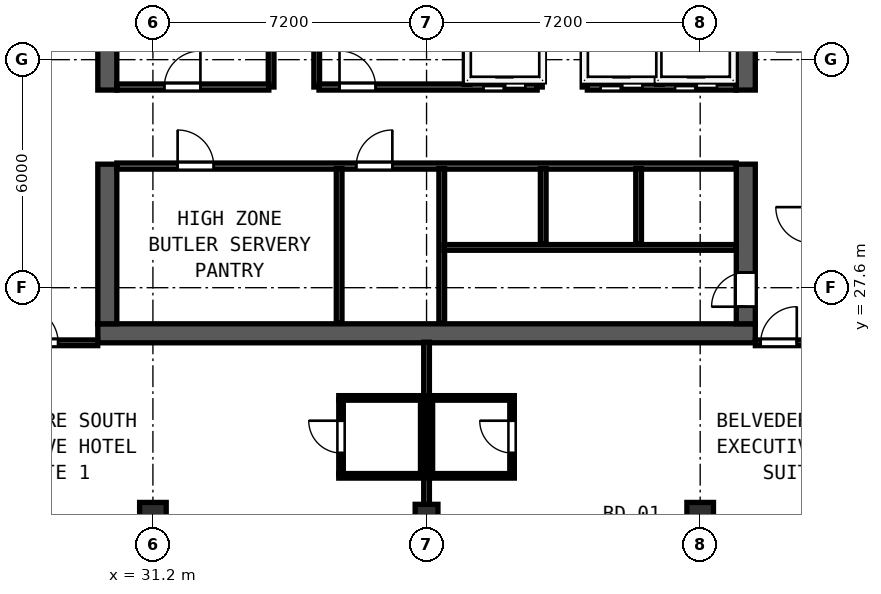
"""IFC4 building model, lengths in metres.
Left out: names, types, materials, properties, quantities, classifications, styles, units other than length and angle.
Written with IfcOpenShell. Run it as: python <this file> out.ifc"""

import sys

from ifc_helpers import new_model, si_unit, direction, frame, frame_2d, origin, origin_2d, place, context, subcontext, project, spatial, rectangle, hollow_rectangle, extrude, element, fill, save


model = new_model("IFC4")
c1 = context("Model", 3, precision=1e-05, world=origin(), true_north=direction((0.0, 1.0)))
c2 = subcontext(c1, "Body", "Model", "MODEL_VIEW")
j1 = project(units=[si_unit("LENGTHUNIT", "METRE"), si_unit("PLANEANGLEUNIT", "RADIAN")], contexts=[c1])
p1 = place(None, origin())
s1 = spatial("IfcSite", under=j1, at=p1, CompositionType="ELEMENT")
p2 = place(p1, origin())
s2 = spatial("IfcBuilding", under=s1, at=p2, CompositionType="ELEMENT")
p3 = place(p2, frame((0.0, 0.0, 293.9)))
s3 = spatial("IfcBuildingStorey", under=s2, at=p3, CompositionType="ELEMENT", Elevation=293.9)
p4 = place(p3, frame((29.75, 26.4, 0.0), z_axis=(0.0, 0.0, 1.0), x_axis=(1.0, 0.0, 0.0)))
e1 = element("IfcWall", 1, at=p4, inside=s3, PredefinedType="SHEAR", context=c2, shape_type="SweptSolid", body=[
    extrude(rectangle(XDim=17.3, YDim=0.5, at=frame_2d((8.65, 0.0))), origin(), (0.0, 0.0, 1.0), 3.72),
])
p5 = place(p3, frame((30.0, 26.65, 0.0), z_axis=(0.0, 0.0, 1.0), x_axis=(0.0, 1.0, 0.0)))
e2 = element("IfcWall", 2, at=p5, inside=s3, PredefinedType="SHEAR", context=c2, shape_type="SweptSolid", body=[
    extrude(rectangle(XDim=4.2, YDim=0.5, at=frame_2d((2.1, 0.0))), origin(), (0.0, 0.0, 1.0), 3.72),
])
p6 = place(p3, frame((30.0, 32.8, 0.0), z_axis=(0.0, 0.0, 1.0), x_axis=(0.0, 1.0, 0.0)))
e3 = element("IfcWall", 3, at=p6, inside=s3, PredefinedType="SHEAR", context=c2, shape_type="SweptSolid", body=[
    extrude(rectangle(XDim=10.15, YDim=0.5, at=frame_2d((5.075, 0.0))), origin(), (0.0, 0.0, 1.0), 3.72),
])
p7 = place(p3, frame((46.8, 26.65, 0.0), z_axis=(0.0, 0.0, 1.0), x_axis=(0.0, 1.0, 0.0)))
e4 = element("IfcWall", 4, at=p7, inside=s3, PredefinedType="SHEAR", context=c2, shape_type="SweptSolid", body=[
    extrude(rectangle(XDim=4.2, YDim=0.5, at=frame_2d((2.1, 0.0))), origin(), (0.0, 0.0, 1.0), 3.72),
])
p8 = place(p7, frame((1.35, 0.0, 0.0), z_axis=(0.0, 0.0, 1.0), x_axis=(-1.0, 0.0, 0.0)))
e5 = element("IfcOpeningElement", 5, at=p8, cuts=e4, PredefinedType="OPENING", context=c2, shape_type="SweptSolid", body=[
    extrude(rectangle(XDim=0.9, YDim=2.1, at=frame_2d((0.45, 1.05))), frame((0.0, 0.26, 0.0), z_axis=(0.0, -1.0, 0.0), x_axis=(1.0, 0.0, 0.0)), (0.0, 0.0, 1.0), 0.52),
])
p9 = place(p3, frame((46.8, 32.8, 0.0), z_axis=(0.0, 0.0, 1.0), x_axis=(0.0, 1.0, 0.0)))
e6 = element("IfcWall", 6, at=p9, inside=s3, PredefinedType="SHEAR", context=c2, shape_type="SweptSolid", body=[
    extrude(rectangle(XDim=10.15, YDim=0.5, at=frame_2d((5.075, 0.0))), origin(), (0.0, 0.0, 1.0), 3.72),
])
for number, where, z_axis, x_axis in (
    (7, (31.2, 21.6, 0.0), (0.0, 0.0, 1.0), (1.0, 0.0, 0.0)),
    (8, (45.6, 21.6, 0.0), (0.0, 0.0, 1.0), (1.0, 0.0, 0.0)),
):
    element("IfcColumn", number, at=place(p3, frame(where, z_axis=z_axis, x_axis=x_axis)), inside=s3, PredefinedType="COLUMN", context=c2, shape_type="SweptSolid", body=[
        extrude(hollow_rectangle(XDim=0.7, YDim=0.7, WallThickness=0.026, at=origin_2d()), origin(), (0.0, 0.0, 1.0), 3.9),
    ])
p10 = place(p3, frame((38.4, 21.6, 0.0), z_axis=(0.0, 0.0, 1.0), x_axis=(1.0, 0.0, 0.0)))
e9 = element("IfcColumn", 9, at=p10, inside=s3, PredefinedType="COLUMN", context=c2, shape_type="SweptSolid", body=[
    extrude(hollow_rectangle(XDim=0.6, YDim=0.6, WallThickness=0.024, at=origin_2d()), origin(), (0.0, 0.0, 1.0), 3.9),
])
p11 = place(p3, frame((47.933, 20.497, 0.0), z_axis=(0.0, 0.0, 1.0), x_axis=(0.970136341762, 0.242560257242, 0.0)))
e10 = element("IfcWall", 10, at=p11, inside=s3, PredefinedType="SOLIDWALL", context=c2, shape_type="SweptSolid", body=[
    extrude(rectangle(XDim=4.664, YDim=0.22, at=frame_2d((2.332, 0.0))), origin(), (0.0, 0.0, 1.0), 3.365),
])
p12 = place(p11, frame((0.7, 0.0, 0.85)))
e11 = element("IfcOpeningElement", 11, at=p12, cuts=e10, PredefinedType="OPENING", context=c2, shape_type="SweptSolid", body=[
    extrude(rectangle(XDim=1.25, YDim=1.95, at=frame_2d((0.625, 0.975))), frame((0.0, 0.12, 0.0), z_axis=(0.0, -1.0, 0.0), x_axis=(1.0, 0.0, 0.0)), (0.0, 0.0, 1.0), 0.24),
])
p13 = place(p3, frame((24.342, 21.628, 0.0), z_axis=(0.0, 0.0, 1.0), x_axis=(0.970136341762, -0.242560257242, 0.0)))
e12 = element("IfcWall", 12, at=p13, inside=s3, PredefinedType="SOLIDWALL", context=c2, shape_type="SweptSolid", body=[
    extrude(rectangle(XDim=4.664, YDim=0.22, at=frame_2d((2.332, 0.0))), origin(), (0.0, 0.0, 1.0), 3.365),
])
p14 = place(p13, frame((0.7, 0.0, 0.85)))
e13 = element("IfcOpeningElement", 13, at=p14, cuts=e12, PredefinedType="OPENING", context=c2, shape_type="SweptSolid", body=[
    extrude(rectangle(XDim=1.25, YDim=1.95, at=frame_2d((0.625, 0.975))), frame((0.0, 0.12, 0.0), z_axis=(0.0, -1.0, 0.0), x_axis=(1.0, 0.0, 0.0)), (0.0, 0.0, 1.0), 0.24),
])
for number, where, z_axis, x_axis in (
    (14, (34.31, 32.88, 0.0), (0.0, 0.0, 1.0), (0.0, 1.0, 0.0)),
    (15, (35.51, 32.88, 0.0), (0.0, 0.0, 1.0), (0.0, 1.0, 0.0)),
    (16, (41.37, 32.88, 0.0), (0.0, 0.0, 1.0), (0.0, 1.0, 0.0)),
    (17, (42.57, 32.88, 0.0), (0.0, 0.0, 1.0), (0.0, 1.0, 0.0)),
):
    element("IfcWall", number, at=place(p3, frame(where, z_axis=z_axis, x_axis=x_axis)), inside=s3, PredefinedType="SOLIDWALL", context=c2, shape_type="SweptSolid", body=[
        extrude(rectangle(XDim=2.17, YDim=0.15, at=frame_2d((1.085, 0.0))), origin(), (0.0, 0.0, 1.0), 3.72),
    ])
p15 = place(p3, frame((30.25, 32.88, 0.0), z_axis=(0.0, 0.0, 1.0), x_axis=(1.0, 0.0, 0.0)))
e18 = element("IfcWall", 18, at=p15, inside=s3, PredefinedType="SOLIDWALL", context=c2, shape_type="SweptSolid", body=[
    extrude(rectangle(XDim=4.0, YDim=0.16, at=frame_2d((2.0, 0.0))), origin(), (0.0, 0.0, 1.0), 3.72),
])
p16 = place(p15, frame((2.2, 0.0, 0.0), z_axis=(0.0, 0.0, 1.0), x_axis=(-1.0, 0.0, 0.0)))
e19 = element("IfcOpeningElement", 19, at=p16, cuts=e18, PredefinedType="OPENING", context=c2, shape_type="SweptSolid", body=[
    extrude(rectangle(XDim=0.95, YDim=2.12, at=frame_2d((0.475, 1.06))), frame((0.0, 0.09, 0.0), z_axis=(0.0, -1.0, 0.0), x_axis=(1.0, 0.0, 0.0)), (0.0, 0.0, 1.0), 0.18),
])
p17 = place(p3, frame((35.57, 32.88, 0.0), z_axis=(0.0, 0.0, 1.0), x_axis=(1.0, 0.0, 0.0)))
e20 = element("IfcWall", 20, at=p17, inside=s3, PredefinedType="SOLIDWALL", context=c2, shape_type="SweptSolid", body=[
    extrude(rectangle(XDim=5.74, YDim=0.16, at=frame_2d((2.87, 0.0))), origin(), (0.0, 0.0, 1.0), 3.72),
])
p18 = place(p17, frame((1.49, 0.0, 0.0), z_axis=(0.0, 0.0, 1.0), x_axis=(-1.0, 0.0, 0.0)))
e21 = element("IfcOpeningElement", 21, at=p18, cuts=e20, PredefinedType="OPENING", context=c2, shape_type="SweptSolid", body=[
    extrude(rectangle(XDim=0.95, YDim=2.12, at=frame_2d((0.475, 1.06))), frame((0.0, 0.09, 0.0), z_axis=(0.0, -1.0, 0.0), x_axis=(1.0, 0.0, 0.0)), (0.0, 0.0, 1.0), 0.18),
])
p19 = place(p17, frame((5.43, 0.0, 0.0), z_axis=(0.0, 0.0, 1.0), x_axis=(-1.0, 0.0, 0.0)))
e22 = element("IfcOpeningElement", 22, at=p19, cuts=e20, PredefinedType="OPENING", context=c2, shape_type="SweptSolid", body=[
    extrude(rectangle(XDim=1.1, YDim=2.2, at=frame_2d((0.55, 1.1))), frame((0.0, 0.09, 0.0), z_axis=(0.0, -1.0, 0.0), x_axis=(1.0, 0.0, 0.0)), (0.0, 0.0, 1.0), 0.18),
])
p20 = place(p3, frame((42.63, 32.88, 0.0), z_axis=(0.0, 0.0, 1.0), x_axis=(1.0, 0.0, 0.0)))
e23 = element("IfcWall", 23, at=p20, inside=s3, PredefinedType="SOLIDWALL", context=c2, shape_type="SweptSolid", body=[
    extrude(rectangle(XDim=3.92, YDim=0.16, at=frame_2d((1.96, 0.0))), origin(), (0.0, 0.0, 1.0), 3.72),
])
p21 = place(p20, frame((1.45, 0.0, 0.0), z_axis=(0.0, 0.0, 1.0), x_axis=(-1.0, 0.0, 0.0)))
e24 = element("IfcOpeningElement", 24, at=p21, cuts=e23, PredefinedType="OPENING", context=c2, shape_type="SweptSolid", body=[
    extrude(rectangle(XDim=1.1, YDim=2.2, at=frame_2d((0.55, 1.1))), frame((0.0, 0.09, 0.0), z_axis=(0.0, -1.0, 0.0), x_axis=(1.0, 0.0, 0.0)), (0.0, 0.0, 1.0), 0.18),
])
p22 = place(p20, frame((3.41, 0.0, 0.0), z_axis=(0.0, 0.0, 1.0), x_axis=(-1.0, 0.0, 0.0)))
e25 = element("IfcOpeningElement", 25, at=p22, cuts=e23, PredefinedType="OPENING", context=c2, shape_type="SweptSolid", body=[
    extrude(rectangle(XDim=1.1, YDim=2.2, at=frame_2d((0.55, 1.1))), frame((0.0, 0.09, 0.0), z_axis=(0.0, -1.0, 0.0), x_axis=(1.0, 0.0, 0.0)), (0.0, 0.0, 1.0), 0.18),
])
for number, where, z_axis, x_axis in (
    (26, (39.47, 32.95, 0.0), (0.0, 0.0, 1.0), (0.0, 1.0, 0.0)),
    (27, (44.53, 32.95, 0.0), (0.0, 0.0, 1.0), (0.0, 1.0, 0.0)),
):
    element("IfcWall", number, at=place(p3, frame(where, z_axis=z_axis, x_axis=x_axis)), inside=s3, PredefinedType="SOLIDWALL", context=c2, shape_type="SweptSolid", body=[
        extrude(rectangle(XDim=2.05, YDim=0.15, at=frame_2d((1.025, 0.0))), origin(), (0.0, 0.0, 1.0), 3.72),
    ])
p23 = place(p3, frame((30.25, 30.8, 0.0), z_axis=(0.0, 0.0, 1.0), x_axis=(1.0, 0.0, 0.0)))
e28 = element("IfcWall", 28, at=p23, inside=s3, PredefinedType="SOLIDWALL", context=c2, shape_type="SweptSolid", body=[
    extrude(rectangle(XDim=16.3, YDim=0.16, at=frame_2d((8.15, 0.0))), origin(), (0.0, 0.0, 1.0), 3.72),
])
p24 = place(p23, frame((1.6, 0.0, 0.0)))
e29 = element("IfcOpeningElement", 29, at=p24, cuts=e28, PredefinedType="OPENING", context=c2, shape_type="SweptSolid", body=[
    extrude(rectangle(XDim=0.95, YDim=2.12, at=frame_2d((0.475, 1.06))), frame((0.0, 0.09, 0.0), z_axis=(0.0, -1.0, 0.0), x_axis=(1.0, 0.0, 0.0)), (0.0, 0.0, 1.0), 0.18),
])
p25 = place(p23, frame((6.3, 0.0, 0.0)))
e30 = element("IfcOpeningElement", 30, at=p25, cuts=e28, PredefinedType="OPENING", context=c2, shape_type="SweptSolid", body=[
    extrude(rectangle(XDim=0.95, YDim=2.12, at=frame_2d((0.475, 1.06))), frame((0.0, 0.09, 0.0), z_axis=(0.0, -1.0, 0.0), x_axis=(1.0, 0.0, 0.0)), (0.0, 0.0, 1.0), 0.18),
])
p26 = place(p3, frame((38.8, 26.66, 0.0), z_axis=(0.0, 0.0, 1.0), x_axis=(0.0, 1.0, 0.0)))
e31 = element("IfcWall", 31, at=p26, inside=s3, PredefinedType="SOLIDWALL", context=c2, shape_type="SweptSolid", body=[
    extrude(rectangle(XDim=4.075, YDim=0.15, at=frame_2d((2.038, 0.0))), origin(), (0.0, 0.0, 1.0), 3.72),
])
p27 = place(p3, frame((36.1, 26.66, 0.0), z_axis=(0.0, 0.0, 1.0), x_axis=(0.0, 1.0, 0.0)))
e32 = element("IfcWall", 32, at=p27, inside=s3, PredefinedType="PARTITIONING", context=c2, shape_type="SweptSolid", body=[
    extrude(rectangle(XDim=4.075, YDim=0.15, at=frame_2d((2.038, 0.0))), origin(), (0.0, 0.0, 1.0), 3.72),
])
p28 = place(p3, frame((38.86, 28.66, 0.0), z_axis=(0.0, 0.0, 1.0), x_axis=(1.0, 0.0, 0.0)))
e33 = element("IfcWall", 33, at=p28, inside=s3, PredefinedType="PARTITIONING", context=c2, shape_type="SweptSolid", body=[
    extrude(rectangle(XDim=7.69, YDim=0.15, at=frame_2d((3.845, 0.0))), origin(), (0.0, 0.0, 1.0), 3.72),
])
for number, where, z_axis, x_axis in (
    (34, (41.47, 28.75, 0.0), (0.0, 0.0, 1.0), (0.0, 1.0, 0.0)),
    (35, (43.98, 28.75, 0.0), (0.0, 0.0, 1.0), (0.0, 1.0, 0.0)),
):
    element("IfcWall", number, at=place(p3, frame(where, z_axis=z_axis, x_axis=x_axis)), inside=s3, PredefinedType="SOLIDWALL", context=c2, shape_type="SweptSolid", body=[
        extrude(rectangle(XDim=1.985, YDim=0.15, at=frame_2d((0.993, 0.0))), origin(), (0.0, 0.0, 1.0), 3.72),
    ])
p29 = place(p3, frame((24.212, 26.15, 0.0), z_axis=(0.0, 0.0, 1.0), x_axis=(1.0, 0.0, 0.0)))
e36 = element("IfcWall", 36, at=p29, inside=s3, PredefinedType="PARTITIONING", context=c2, shape_type="SweptSolid", body=[
    extrude(rectangle(XDim=5.536, YDim=0.15, at=frame_2d((2.768, 0.0))), origin(), (0.0, 0.0, 1.0), 3.72),
])
p30 = place(p29, frame((4.495, 0.0, 0.0), z_axis=(0.0, 0.0, 1.0), x_axis=(-1.0, 0.0, 0.0)))
e37 = element("IfcOpeningElement", 37, at=p30, cuts=e36, PredefinedType="OPENING", context=c2, shape_type="SweptSolid", body=[
    extrude(rectangle(XDim=0.95, YDim=2.18, at=frame_2d((0.475, 1.09))), frame((0.0, 0.085, 0.0), z_axis=(0.0, -1.0, 0.0), x_axis=(1.0, 0.0, 0.0)), (0.0, 0.0, 1.0), 0.17),
])
p31 = place(p3, frame((38.4, 20.612, 0.0), z_axis=(0.0, 0.0, 1.0), x_axis=(0.0, 1.0, 0.0)))
e38 = element("IfcWall", 38, at=p31, inside=s3, PredefinedType="PARTITIONING", context=c2, shape_type="SweptSolid", body=[
    extrude(rectangle(XDim=5.553, YDim=0.15, at=frame_2d((2.776, 0.0))), origin(), (0.0, 0.0, 1.0), 3.205),
])
for number, where, z_axis, x_axis in (
    (39, (36.09, 24.7, 0.0), (0.0, 0.0, 1.0), (1.0, 0.0, 0.0)),
    (40, (36.09, 22.65, 0.0), (0.0, 0.0, 1.0), (1.0, 0.0, 0.0)),
):
    element("IfcWall", number, at=place(p3, frame(where, z_axis=z_axis, x_axis=x_axis)), inside=s3, PredefinedType="PARTITIONING", context=c2, shape_type="SweptSolid", body=[
        extrude(rectangle(XDim=2.25, YDim=0.12, at=frame_2d((1.125, 0.0))), origin(), (0.0, 0.0, 1.0), 3.72),
    ])
p32 = place(p3, frame((36.15, 22.695, 0.0), z_axis=(0.0, 0.0, 1.0), x_axis=(0.0, 1.0, 0.0)))
e41 = element("IfcWall", 41, at=p32, inside=s3, PredefinedType="PARTITIONING", context=c2, shape_type="SweptSolid", body=[
    extrude(rectangle(XDim=1.96, YDim=0.12, at=frame_2d((0.98, 0.0))), origin(), (0.0, 0.0, 1.0), 3.72),
])
p33 = place(p32, frame((1.405, 0.0, 0.0), z_axis=(0.0, 0.0, 1.0), x_axis=(-1.0, 0.0, 0.0)))
e42 = element("IfcOpeningElement", 42, at=p33, cuts=e41, PredefinedType="OPENING", context=c2, shape_type="SweptSolid", body=[
    extrude(rectangle(XDim=0.85, YDim=2.1, at=frame_2d((0.425, 1.05))), frame((0.0, 0.07, 0.0), z_axis=(0.0, -1.0, 0.0), x_axis=(1.0, 0.0, 0.0)), (0.0, 0.0, 1.0), 0.14),
])
p34 = place(p3, frame((38.3, 22.695, 0.0), z_axis=(0.0, 0.0, 1.0), x_axis=(0.0, 1.0, 0.0)))
e43 = element("IfcWall", 43, at=p34, inside=s3, PredefinedType="PARTITIONING", context=c2, shape_type="SweptSolid", body=[
    extrude(rectangle(XDim=1.96, YDim=0.12, at=frame_2d((0.98, 0.0))), origin(), (0.0, 0.0, 1.0), 3.255),
])
p35 = place(p3, frame((47.052, 26.15, 0.0), z_axis=(0.0, 0.0, 1.0), x_axis=(1.0, 0.0, 0.0)))
e44 = element("IfcWall", 44, at=p35, inside=s3, PredefinedType="PARTITIONING", context=c2, shape_type="SweptSolid", body=[
    extrude(rectangle(XDim=5.536, YDim=0.15, at=frame_2d((2.768, 0.0))), origin(), (0.0, 0.0, 1.0), 3.72),
])
p36 = place(p35, frame((1.09, 0.0, 0.0), z_axis=(0.0, 0.0, 1.0), x_axis=(-1.0, 0.0, 0.0)))
e45 = element("IfcOpeningElement", 45, at=p36, cuts=e44, PredefinedType="OPENING", context=c2, shape_type="SweptSolid", body=[
    extrude(rectangle(XDim=0.95, YDim=2.18, at=frame_2d((0.475, 1.09))), frame((0.0, 0.085, 0.0), z_axis=(0.0, -1.0, 0.0), x_axis=(1.0, 0.0, 0.0)), (0.0, 0.0, 1.0), 0.17),
])
for number, where, z_axis, x_axis in (
    (46, (38.46, 24.7, 0.0), (0.0, 0.0, 1.0), (1.0, 0.0, 0.0)),
    (47, (38.46, 22.65, 0.0), (0.0, 0.0, 1.0), (1.0, 0.0, 0.0)),
):
    element("IfcWall", number, at=place(p3, frame(where, z_axis=z_axis, x_axis=x_axis)), inside=s3, PredefinedType="PARTITIONING", context=c2, shape_type="SweptSolid", body=[
        extrude(rectangle(XDim=2.25, YDim=0.12, at=frame_2d((1.125, 0.0))), origin(), (0.0, 0.0, 1.0), 3.72),
    ])
p37 = place(p3, frame((38.5, 22.695, 0.0), z_axis=(0.0, 0.0, 1.0), x_axis=(0.0, 1.0, 0.0)))
e48 = element("IfcWall", 48, at=p37, inside=s3, PredefinedType="PARTITIONING", context=c2, shape_type="SweptSolid", body=[
    extrude(rectangle(XDim=1.96, YDim=0.12, at=frame_2d((0.98, 0.0))), origin(), (0.0, 0.0, 1.0), 3.255),
])
p38 = place(p3, frame((40.65, 22.695, 0.0), z_axis=(0.0, 0.0, 1.0), x_axis=(0.0, 1.0, 0.0)))
e49 = element("IfcWall", 49, at=p38, inside=s3, PredefinedType="PARTITIONING", context=c2, shape_type="SweptSolid", body=[
    extrude(rectangle(XDim=1.96, YDim=0.12, at=frame_2d((0.98, 0.0))), origin(), (0.0, 0.0, 1.0), 3.72),
])
p39 = place(p38, frame((0.555, 0.0, 0.0)))
e50 = element("IfcOpeningElement", 50, at=p39, cuts=e49, PredefinedType="OPENING", context=c2, shape_type="SweptSolid", body=[
    extrude(rectangle(XDim=0.85, YDim=2.1, at=frame_2d((0.425, 1.05))), frame((0.0, 0.07, 0.0), z_axis=(0.0, -1.0, 0.0), x_axis=(1.0, 0.0, 0.0)), (0.0, 0.0, 1.0), 0.14),
])
p40 = place(p16, origin())
e51 = element("IfcDoor", 51, at=p40, inside=s3, OperationType="SINGLE_SWING_LEFT", PredefinedType="DOOR", context=c2, shape_type="SweptSolid", body=[
    extrude(rectangle(XDim=0.95, YDim=2.12, at=frame_2d((0.475, 1.06))), frame((0.0, 0.025, 0.0), z_axis=(0.0, -1.0, 0.0), x_axis=(1.0, 0.0, 0.0)), (0.0, 0.0, 1.0), 0.05),
])
fill(e19, e51)
p41 = place(p18, origin())
e52 = element("IfcDoor", 52, at=p41, inside=s3, OperationType="SINGLE_SWING_RIGHT", PredefinedType="DOOR", context=c2, shape_type="SweptSolid", body=[
    extrude(rectangle(XDim=0.95, YDim=2.12, at=frame_2d((0.475, 1.06))), frame((0.0, 0.025, 0.0), z_axis=(0.0, -1.0, 0.0), x_axis=(1.0, 0.0, 0.0)), (0.0, 0.0, 1.0), 0.05),
])
fill(e21, e52)
p42 = place(p19, origin())
e53 = element("IfcDoor", 53, at=p42, inside=s3, OperationType="SLIDING_TO_RIGHT", PredefinedType="DOOR", context=c2, shape_type="SweptSolid", body=[
    extrude(rectangle(XDim=1.1, YDim=2.2, at=frame_2d((0.55, 1.1))), frame((0.0, 0.025, 0.0), z_axis=(0.0, -1.0, 0.0), x_axis=(1.0, 0.0, 0.0)), (0.0, 0.0, 1.0), 0.05),
])
fill(e22, e53)
p43 = place(p21, origin())
e54 = element("IfcDoor", 54, at=p43, inside=s3, OperationType="SLIDING_TO_RIGHT", PredefinedType="DOOR", context=c2, shape_type="SweptSolid", body=[
    extrude(rectangle(XDim=1.1, YDim=2.2, at=frame_2d((0.55, 1.1))), frame((0.0, 0.025, 0.0), z_axis=(0.0, -1.0, 0.0), x_axis=(1.0, 0.0, 0.0)), (0.0, 0.0, 1.0), 0.05),
])
fill(e24, e54)
p44 = place(p22, origin())
e55 = element("IfcDoor", 55, at=p44, inside=s3, OperationType="SLIDING_TO_RIGHT", PredefinedType="DOOR", context=c2, shape_type="SweptSolid", body=[
    extrude(rectangle(XDim=1.1, YDim=2.2, at=frame_2d((0.55, 1.1))), frame((0.0, 0.025, 0.0), z_axis=(0.0, -1.0, 0.0), x_axis=(1.0, 0.0, 0.0)), (0.0, 0.0, 1.0), 0.05),
])
fill(e25, e55)
p45 = place(p24, origin())
e56 = element("IfcDoor", 56, at=p45, inside=s3, OperationType="SINGLE_SWING_LEFT", PredefinedType="DOOR", context=c2, shape_type="SweptSolid", body=[
    extrude(rectangle(XDim=0.95, YDim=2.12, at=frame_2d((0.475, 1.06))), frame((0.0, 0.025, 0.0), z_axis=(0.0, -1.0, 0.0), x_axis=(1.0, 0.0, 0.0)), (0.0, 0.0, 1.0), 0.05),
])
fill(e29, e56)
p46 = place(p25, origin())
e57 = element("IfcDoor", 57, at=p46, inside=s3, OperationType="SINGLE_SWING_RIGHT", PredefinedType="DOOR", context=c2, shape_type="SweptSolid", body=[
    extrude(rectangle(XDim=0.95, YDim=2.12, at=frame_2d((0.475, 1.06))), frame((0.0, 0.025, 0.0), z_axis=(0.0, -1.0, 0.0), x_axis=(1.0, 0.0, 0.0)), (0.0, 0.0, 1.0), 0.05),
])
fill(e30, e57)
p47 = place(p8, origin())
e58 = element("IfcDoor", 58, at=p47, inside=s3, OperationType="SINGLE_SWING_RIGHT", PredefinedType="DOOR", context=c2, shape_type="SweptSolid", body=[
    extrude(rectangle(XDim=0.9, YDim=2.1, at=frame_2d((0.45, 1.05))), frame((0.0, -0.135, 0.0), z_axis=(0.0, -1.0, 0.0), x_axis=(1.0, 0.0, 0.0)), (0.0, 0.0, 1.0), 0.05),
])
fill(e5, e58)
p48 = place(p30, origin())
e59 = element("IfcDoor", 59, at=p48, inside=s3, OperationType="SINGLE_SWING_RIGHT", PredefinedType="DOOR", context=c2, shape_type="SweptSolid", body=[
    extrude(rectangle(XDim=0.95, YDim=2.18, at=frame_2d((0.475, 1.09))), frame((0.0, 0.025, 0.0), z_axis=(0.0, -1.0, 0.0), x_axis=(1.0, 0.0, 0.0)), (0.0, 0.0, 1.0), 0.05),
])
fill(e37, e59)
p49 = place(p33, origin())
e60 = element("IfcDoor", 60, at=p49, inside=s3, OperationType="SINGLE_SWING_LEFT", PredefinedType="DOOR", context=c2, shape_type="SweptSolid", body=[
    extrude(rectangle(XDim=0.85, YDim=2.1, at=frame_2d((0.425, 1.05))), frame((0.0, 0.025, 0.0), z_axis=(0.0, -1.0, 0.0), x_axis=(1.0, 0.0, 0.0)), (0.0, 0.0, 1.0), 0.05),
])
fill(e42, e60)
p50 = place(p36, origin())
e61 = element("IfcDoor", 61, at=p50, inside=s3, OperationType="SINGLE_SWING_LEFT", PredefinedType="DOOR", context=c2, shape_type="SweptSolid", body=[
    extrude(rectangle(XDim=0.95, YDim=2.18, at=frame_2d((0.475, 1.09))), frame((0.0, 0.025, 0.0), z_axis=(0.0, -1.0, 0.0), x_axis=(1.0, 0.0, 0.0)), (0.0, 0.0, 1.0), 0.05),
])
fill(e45, e61)
p51 = place(p39, origin())
e62 = element("IfcDoor", 62, at=p51, inside=s3, OperationType="SINGLE_SWING_RIGHT", PredefinedType="DOOR", context=c2, shape_type="SweptSolid", body=[
    extrude(rectangle(XDim=0.85, YDim=2.1, at=frame_2d((0.425, 1.05))), frame((0.0, 0.025, 0.0), z_axis=(0.0, -1.0, 0.0), x_axis=(1.0, 0.0, 0.0)), (0.0, 0.0, 1.0), 0.05),
])
fill(e50, e62)
save(model, sys.argv[1])
